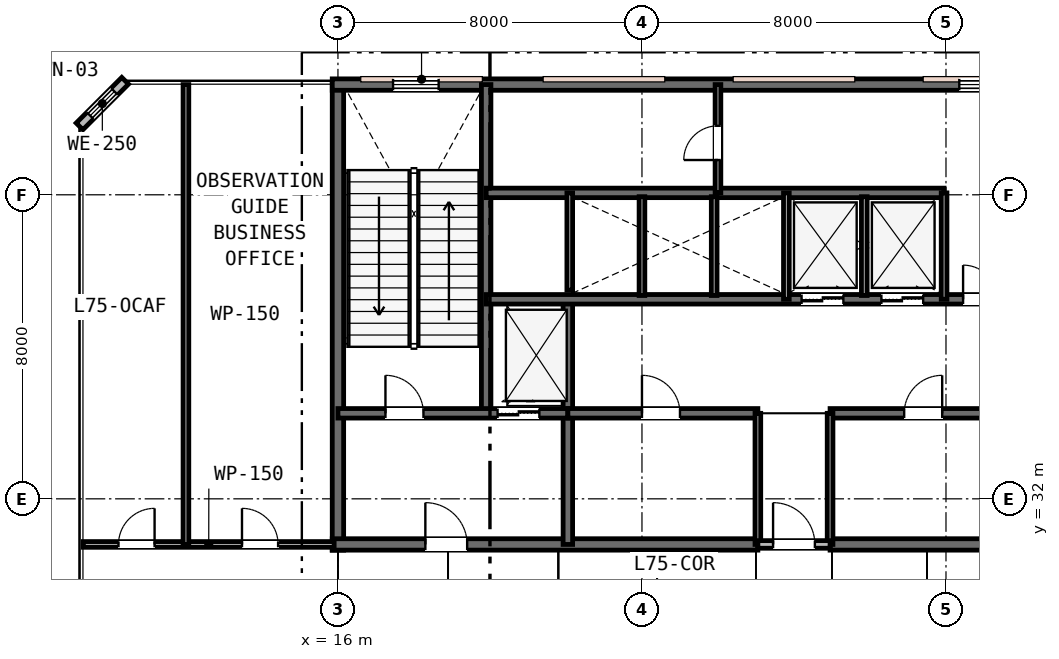
"""IFC4 building model, lengths in metres.
Left out: names, types, materials, properties, quantities, classifications, styles, units other than length and angle.
Written with IfcOpenShell. Run it as: python <this file> out.ifc"""

import sys

from ifc_helpers import new_model, si_unit, direction, frame, frame_2d, origin, place, context, subcontext, project, spatial, rectangle, extrude, element, fill, save


model = new_model("IFC4")
c1 = context("Model", 3, precision=1e-05, world=origin(), true_north=direction((0.0, 1.0)))
c2 = subcontext(c1, "Body", "Model", "MODEL_VIEW")
j1 = project(units=[si_unit("LENGTHUNIT", "METRE"), si_unit("PLANEANGLEUNIT", "RADIAN")], contexts=[c1])
p1 = place(None, origin())
s1 = spatial("IfcSite", under=j1, at=p1, CompositionType="ELEMENT")
p2 = place(p1, origin())
s2 = spatial("IfcBuilding", under=s1, at=p2, CompositionType="ELEMENT")
p3 = place(p2, frame((0.0, 0.0, 290.6)))
s3 = spatial("IfcBuildingStorey", under=s2, at=p3, CompositionType="ELEMENT", Elevation=290.6)
p4 = place(p3, frame((16.0, 30.65, 0.0), z_axis=(0.0, 0.0, 1.0), x_axis=(0.0, 1.0, 0.0)))
e1 = element("IfcWall", 1, at=p4, inside=s3, PredefinedType="SHEAR", context=c2, shape_type="SweptSolid", body=[
    extrude(rectangle(XDim=12.3, YDim=0.3, at=frame_2d((6.15, 0.0))), origin(), (0.0, 0.0, 1.0), 5.2),
])
p5 = place(p3, frame((15.85, 42.9, 0.0), z_axis=(0.0, 0.0, 1.0), x_axis=(1.0, 0.0, 0.0)))
e2 = element("IfcWall", 2, at=p5, inside=s3, PredefinedType="SHEAR", context=c2, shape_type="SweptSolid", body=[
    extrude(rectangle(XDim=24.3, YDim=0.3, at=frame_2d((12.15, 0.0))), origin(), (0.0, 0.0, 1.0), 5.2),
])
p6 = place(p5, frame((1.6, 0.0, 0.95)))
e3 = element("IfcOpeningElement", 3, at=p6, cuts=e2, PredefinedType="OPENING", context=c2, shape_type="SweptSolid", body=[
    extrude(rectangle(XDim=1.2, YDim=1.6, at=frame_2d((0.6, 0.8))), frame((0.0, 0.16, 0.0), z_axis=(0.0, -1.0, 0.0), x_axis=(1.0, 0.0, 0.0)), (0.0, 0.0, 1.0), 0.32),
])
p7 = place(p5, frame((16.5, 0.0, 0.95)))
e4 = element("IfcOpeningElement", 4, at=p7, cuts=e2, PredefinedType="OPENING", context=c2, shape_type="SweptSolid", body=[
    extrude(rectangle(XDim=1.2, YDim=1.6, at=frame_2d((0.6, 0.8))), frame((0.0, 0.16, 0.0), z_axis=(0.0, -1.0, 0.0), x_axis=(1.0, 0.0, 0.0)), (0.0, 0.0, 1.0), 0.32),
])
p8 = place(p5, frame((21.6, 0.0, 0.95)))
e5 = element("IfcOpeningElement", 5, at=p8, cuts=e2, PredefinedType="OPENING", context=c2, shape_type="SweptSolid", body=[
    extrude(rectangle(XDim=1.2, YDim=1.6, at=frame_2d((0.6, 0.8))), frame((0.0, 0.16, 0.0), z_axis=(0.0, -1.0, 0.0), x_axis=(1.0, 0.0, 0.0)), (0.0, 0.0, 1.0), 0.32),
])
p9 = place(p3, frame((15.85, 30.8, 0.0), z_axis=(0.0, 0.0, 1.0), x_axis=(1.0, 0.0, 0.0)))
e6 = element("IfcWall", 6, at=p9, inside=s3, PredefinedType="SHEAR", context=c2, shape_type="SweptSolid", body=[
    extrude(rectangle(XDim=11.2, YDim=0.3, at=frame_2d((5.6, 0.0))), origin(), (0.0, 0.0, 1.0), 5.2),
])
p10 = place(p9, frame((2.45, 0.0, 0.0)))
e7 = element("IfcOpeningElement", 7, at=p10, cuts=e6, PredefinedType="OPENING", context=c2, shape_type="SweptSolid", body=[
    extrude(rectangle(XDim=1.1, YDim=2.15, at=frame_2d((0.55, 1.075))), frame((0.0, 0.16, 0.0), z_axis=(0.0, -1.0, 0.0), x_axis=(1.0, 0.0, 0.0)), (0.0, 0.0, 1.0), 0.32),
])
p11 = place(p3, frame((28.95, 30.8, 0.0), z_axis=(0.0, 0.0, 1.0), x_axis=(1.0, 0.0, 0.0)))
e8 = element("IfcWall", 8, at=p11, inside=s3, PredefinedType="SHEAR", context=c2, shape_type="SweptSolid", body=[
    extrude(rectangle(XDim=11.2, YDim=0.3, at=frame_2d((5.6, 0.0))), origin(), (0.0, 0.0, 1.0), 5.2),
])
p12 = place(p11, frame((7.65, 0.0, 0.0)))
e9 = element("IfcOpeningElement", 9, at=p12, cuts=e8, PredefinedType="OPENING", context=c2, shape_type="SweptSolid", body=[
    extrude(rectangle(XDim=1.1, YDim=2.15, at=frame_2d((0.55, 1.075))), frame((0.0, 0.16, 0.0), z_axis=(0.0, -1.0, 0.0), x_axis=(1.0, 0.0, 0.0)), (0.0, 0.0, 1.0), 0.32),
])
p13 = place(p3, frame((19.9, 34.25, 0.0), z_axis=(0.0, 0.0, 1.0), x_axis=(0.0, 1.0, 0.0)))
e10 = element("IfcWall", 10, at=p13, inside=s3, PredefinedType="SHEAR", context=c2, shape_type="SweptSolid", body=[
    extrude(rectangle(XDim=8.65, YDim=0.25, at=frame_2d((4.325, 0.0))), origin(), (0.0, 0.0, 1.0), 5.2),
])
p14 = place(p3, frame((22.05, 30.8, 0.0), z_axis=(0.0, 0.0, 1.0), x_axis=(0.0, 1.0, 0.0)))
e11 = element("IfcWall", 11, at=p14, inside=s3, PredefinedType="SHEAR", context=c2, shape_type="SweptSolid", body=[
    extrude(rectangle(XDim=6.45, YDim=0.25, at=frame_2d((3.225, 0.0))), origin(), (0.0, 0.0, 1.0), 5.2),
])
p15 = place(p3, frame((16.0, 34.25, 0.0), z_axis=(0.0, 0.0, 1.0), x_axis=(1.0, 0.0, 0.0)))
e12 = element("IfcWall", 12, at=p15, inside=s3, PredefinedType="SHEAR", context=c2, shape_type="SweptSolid", body=[
    extrude(rectangle(XDim=6.05, YDim=0.25, at=frame_2d((3.025, 0.0))), origin(), (0.0, 0.0, 1.0), 5.2),
])
p16 = place(p15, frame((1.25, 0.0, 0.0)))
e13 = element("IfcOpeningElement", 13, at=p16, cuts=e12, PredefinedType="OPENING", context=c2, shape_type="SweptSolid", body=[
    extrude(rectangle(XDim=1.0, YDim=2.15, at=frame_2d((0.5, 1.075))), frame((0.0, 0.135, 0.0), z_axis=(0.0, -1.0, 0.0), x_axis=(1.0, 0.0, 0.0)), (0.0, 0.0, 1.0), 0.27),
])
p17 = place(p15, frame((4.2, 0.0, 0.0)))
e14 = element("IfcOpeningElement", 14, at=p17, cuts=e12, PredefinedType="OPENING", context=c2, shape_type="SweptSolid", body=[
    extrude(rectangle(XDim=1.1, YDim=2.15, at=frame_2d((0.55, 1.075))), frame((0.0, 0.135, 0.0), z_axis=(0.0, -1.0, 0.0), x_axis=(1.0, 0.0, 0.0)), (0.0, 0.0, 1.0), 0.27),
])
p18 = place(p3, frame((22.05, 34.25, 0.0), z_axis=(0.0, 0.0, 1.0), x_axis=(1.0, 0.0, 0.0)))
e15 = element("IfcWall", 15, at=p18, inside=s3, PredefinedType="SHEAR", context=c2, shape_type="SweptSolid", body=[
    extrude(rectangle(XDim=5.0, YDim=0.25, at=frame_2d((2.5, 0.0))), origin(), (0.0, 0.0, 1.0), 5.2),
])
p19 = place(p18, frame((1.95, 0.0, 0.0)))
e16 = element("IfcOpeningElement", 16, at=p19, cuts=e15, PredefinedType="OPENING", context=c2, shape_type="SweptSolid", body=[
    extrude(rectangle(XDim=1.0, YDim=2.15, at=frame_2d((0.5, 1.075))), frame((0.0, 0.135, 0.0), z_axis=(0.0, -1.0, 0.0), x_axis=(1.0, 0.0, 0.0)), (0.0, 0.0, 1.0), 0.27),
])
p20 = place(p3, frame((28.95, 34.25, 0.0), z_axis=(0.0, 0.0, 1.0), x_axis=(1.0, 0.0, 0.0)))
e17 = element("IfcWall", 17, at=p20, inside=s3, PredefinedType="SHEAR", context=c2, shape_type="SweptSolid", body=[
    extrude(rectangle(XDim=5.0, YDim=0.25, at=frame_2d((2.5, 0.0))), origin(), (0.0, 0.0, 1.0), 5.2),
])
p21 = place(p20, frame((1.95, 0.0, 0.0)))
e18 = element("IfcOpeningElement", 18, at=p21, cuts=e17, PredefinedType="OPENING", context=c2, shape_type="SweptSolid", body=[
    extrude(rectangle(XDim=1.0, YDim=2.15, at=frame_2d((0.5, 1.075))), frame((0.0, 0.135, 0.0), z_axis=(0.0, -1.0, 0.0), x_axis=(1.0, 0.0, 0.0)), (0.0, 0.0, 1.0), 0.27),
])
p22 = place(p3, frame((19.9, 37.25, 0.0), z_axis=(0.0, 0.0, 1.0), x_axis=(1.0, 0.0, 0.0)))
e19 = element("IfcWall", 19, at=p22, inside=s3, PredefinedType="SHEAR", context=c2, shape_type="SweptSolid", body=[
    extrude(rectangle(XDim=16.2, YDim=0.25, at=frame_2d((8.1, 0.0))), origin(), (0.0, 0.0, 1.0), 5.2),
])
p23 = place(p22, frame((12.55, 0.0, 0.0)))
e20 = element("IfcOpeningElement", 20, at=p23, cuts=e19, PredefinedType="OPENING", context=c2, shape_type="SweptSolid", body=[
    extrude(rectangle(XDim=0.9, YDim=2.15, at=frame_2d((0.45, 1.075))), frame((0.0, 0.135, 0.0), z_axis=(0.0, -1.0, 0.0), x_axis=(1.0, 0.0, 0.0)), (0.0, 0.0, 1.0), 0.27),
])
p24 = place(p22, frame((8.3, 0.0, 0.0)))
e21 = element("IfcOpeningElement", 21, at=p24, cuts=e19, PredefinedType="OPENING", context=c2, shape_type="SweptSolid", body=[
    extrude(rectangle(XDim=1.1, YDim=2.15, at=frame_2d((0.55, 1.075))), frame((0.0, 0.135, 0.0), z_axis=(0.0, -1.0, 0.0), x_axis=(1.0, 0.0, 0.0)), (0.0, 0.0, 1.0), 0.27),
])
p25 = place(p22, frame((10.4, 0.0, 0.0)))
e22 = element("IfcOpeningElement", 22, at=p25, cuts=e19, PredefinedType="OPENING", context=c2, shape_type="SweptSolid", body=[
    extrude(rectangle(XDim=1.1, YDim=2.15, at=frame_2d((0.55, 1.075))), frame((0.0, 0.135, 0.0), z_axis=(0.0, -1.0, 0.0), x_axis=(1.0, 0.0, 0.0)), (0.0, 0.0, 1.0), 0.27),
])
p26 = place(p3, frame((19.9, 40.05, 0.0), z_axis=(0.0, 0.0, 1.0), x_axis=(1.0, 0.0, 0.0)))
e23 = element("IfcWall", 23, at=p26, inside=s3, PredefinedType="SHEAR", context=c2, shape_type="SweptSolid", body=[
    extrude(rectangle(XDim=12.05, YDim=0.25, at=frame_2d((6.025, 0.0))), origin(), (0.0, 0.0, 1.0), 5.2),
])
p27 = place(p3, frame((10.4, 43.0, 0.0), z_axis=(0.0, 0.0, 1.0), x_axis=(-0.707106781187, -0.707106781187, 0.0)))
e24 = element("IfcWall", 24, at=p27, inside=s3, PredefinedType="STANDARD", context=c2, shape_type="SweptSolid", body=[
    extrude(rectangle(XDim=1.697, YDim=0.25, at=frame_2d((0.849, 0.0))), origin(), (0.0, 0.0, 1.0), 4.87),
])
p28 = place(p27, frame((0.399, 0.0, 0.9)))
e25 = element("IfcOpeningElement", 25, at=p28, cuts=e24, PredefinedType="OPENING", context=c2, shape_type="SweptSolid", body=[
    extrude(rectangle(XDim=0.9, YDim=1.55, at=frame_2d((0.45, 0.775))), frame((0.0, 0.135, 0.0), z_axis=(0.0, -1.0, 0.0), x_axis=(1.0, 0.0, 0.0)), (0.0, 0.0, 1.0), 0.27),
])
for number, where, z_axis, x_axis in (
    (26, (27.05, 30.8, 0.0), (0.0, 0.0, 1.0), (0.0, 1.0, 0.0)),
    (27, (28.95, 30.8, 0.0), (0.0, 0.0, 1.0), (0.0, 1.0, 0.0)),
):
    element("IfcWall", number, at=place(p3, frame(where, z_axis=z_axis, x_axis=x_axis)), inside=s3, PredefinedType="PLUMBINGWALL", context=c2, shape_type="SweptSolid", body=[
        extrude(rectangle(XDim=3.45, YDim=0.15, at=frame_2d((1.725, 0.0))), origin(), (0.0, 0.0, 1.0), 4.67),
    ])
p29 = place(p3, frame((27.05, 30.8, 0.0), z_axis=(0.0, 0.0, 1.0), x_axis=(1.0, 0.0, 0.0)))
e28 = element("IfcWall", 28, at=p29, inside=s3, PredefinedType="PARTITIONING", context=c2, shape_type="SweptSolid", body=[
    extrude(rectangle(XDim=1.9, YDim=0.2, at=frame_2d((0.95, 0.0))), origin(), (0.0, 0.0, 1.0), 4.67),
])
p30 = place(p29, frame((0.4, 0.0, 0.0)))
e29 = element("IfcOpeningElement", 29, at=p30, cuts=e28, PredefinedType="OPENING", context=c2, shape_type="SweptSolid", body=[
    extrude(rectangle(XDim=1.1, YDim=2.15, at=frame_2d((0.55, 1.075))), frame((0.0, 0.11, 0.0), z_axis=(0.0, -1.0, 0.0), x_axis=(1.0, 0.0, 0.0)), (0.0, 0.0, 1.0), 0.22),
])
p31 = place(p3, frame((22.1, 37.49, 0.0), z_axis=(0.0, 0.0, 1.0), x_axis=(0.0, 1.0, 0.0)))
e30 = element("IfcWall", 30, at=p31, inside=s3, PredefinedType="PLUMBINGWALL", context=c2, shape_type="SweptSolid", body=[
    extrude(rectangle(XDim=2.56, YDim=0.15, at=frame_2d((1.28, 0.0))), origin(), (0.0, 0.0, 1.0), 4.87),
])
p32 = place(p3, frame((27.8, 37.25, 0.0), z_axis=(0.0, 0.0, 1.0), x_axis=(0.0, 1.0, 0.0)))
e31 = element("IfcWall", 31, at=p32, inside=s3, PredefinedType="PLUMBINGWALL", context=c2, shape_type="SweptSolid", body=[
    extrude(rectangle(XDim=2.8, YDim=0.15, at=frame_2d((1.4, 0.0))), origin(), (0.0, 0.0, 1.0), 4.87),
])
for number, where, z_axis, x_axis in (
    (32, (24.0, 37.35, 0.0), (0.0, 0.0, 1.0), (0.0, 1.0, 0.0)),
    (33, (25.9, 37.35, 0.0), (0.0, 0.0, 1.0), (0.0, 1.0, 0.0)),
):
    element("IfcWall", number, at=place(p3, frame(where, z_axis=z_axis, x_axis=x_axis)), inside=s3, PredefinedType="PLUMBINGWALL", context=c2, shape_type="SweptSolid", body=[
        extrude(rectangle(XDim=2.6, YDim=0.15, at=frame_2d((1.3, 0.0))), origin(), (0.0, 0.0, 1.0), 4.87),
    ])
p33 = place(p3, frame((31.95, 37.25, 0.0), z_axis=(0.0, 0.0, 1.0), x_axis=(0.0, 1.0, 0.0)))
e34 = element("IfcWall", 34, at=p33, inside=s3, PredefinedType="PLUMBINGWALL", context=c2, shape_type="SweptSolid", body=[
    extrude(rectangle(XDim=2.8, YDim=0.15, at=frame_2d((1.4, 0.0))), origin(), (0.0, 0.0, 1.0), 4.87),
])
p34 = place(p3, frame((29.85, 37.35, 0.0), z_axis=(0.0, 0.0, 1.0), x_axis=(0.0, 1.0, 0.0)))
e35 = element("IfcWall", 35, at=p34, inside=s3, PredefinedType="PLUMBINGWALL", context=c2, shape_type="SweptSolid", body=[
    extrude(rectangle(XDim=2.6, YDim=0.15, at=frame_2d((1.3, 0.0))), origin(), (0.0, 0.0, 1.0), 4.87),
])
p35 = place(p3, frame((26.0, 40.05, 0.0), z_axis=(0.0, 0.0, 1.0), x_axis=(0.0, 1.0, 0.0)))
e36 = element("IfcWall", 36, at=p35, inside=s3, PredefinedType="PARTITIONING", context=c2, shape_type="SweptSolid", body=[
    extrude(rectangle(XDim=2.85, YDim=0.15, at=frame_2d((1.425, 0.0))), origin(), (0.0, 0.0, 1.0), 4.87),
])
p36 = place(p35, frame((0.865, 0.0, 0.0)))
e37 = element("IfcOpeningElement", 37, at=p36, cuts=e36, PredefinedType="OPENING", context=c2, shape_type="SweptSolid", body=[
    extrude(rectangle(XDim=0.9, YDim=2.15, at=frame_2d((0.45, 1.075))), frame((0.0, 0.085, 0.0), z_axis=(0.0, -1.0, 0.0), x_axis=(1.0, 0.0, 0.0)), (0.0, 0.0, 1.0), 0.17),
])
p37 = place(p3, frame((9.3, 30.8, 0.0), z_axis=(0.0, 0.0, 1.0), x_axis=(1.0, 0.0, 0.0)))
e38 = element("IfcWall", 38, at=p37, inside=s3, PredefinedType="PARTITIONING", context=c2, shape_type="SweptSolid", body=[
    extrude(rectangle(XDim=6.6, YDim=0.15, at=frame_2d((3.3, 0.0))), origin(), (0.0, 0.0, 1.0), 4.58),
])
p38 = place(p37, frame((0.925, 0.0, 0.0)))
e39 = element("IfcOpeningElement", 39, at=p38, cuts=e38, PredefinedType="OPENING", context=c2, shape_type="SweptSolid", body=[
    extrude(rectangle(XDim=0.95, YDim=2.15, at=frame_2d((0.475, 1.075))), frame((0.0, 0.085, 0.0), z_axis=(0.0, -1.0, 0.0), x_axis=(1.0, 0.0, 0.0)), (0.0, 0.0, 1.0), 0.17),
])
p39 = place(p37, frame((4.175, 0.0, 0.0)))
e40 = element("IfcOpeningElement", 40, at=p39, cuts=e38, PredefinedType="OPENING", context=c2, shape_type="SweptSolid", body=[
    extrude(rectangle(XDim=0.95, YDim=2.15, at=frame_2d((0.475, 1.075))), frame((0.0, 0.085, 0.0), z_axis=(0.0, -1.0, 0.0), x_axis=(1.0, 0.0, 0.0)), (0.0, 0.0, 1.0), 0.17),
])
p40 = place(p3, frame((12.0, 30.8, 0.0), z_axis=(0.0, 0.0, 1.0), x_axis=(0.0, 1.0, 0.0)))
e41 = element("IfcWall", 41, at=p40, inside=s3, PredefinedType="PARTITIONING", context=c2, shape_type="SweptSolid", body=[
    extrude(rectangle(XDim=12.1, YDim=0.15, at=frame_2d((6.05, 0.0))), origin(), (0.0, 0.0, 1.0), 4.87),
])
p41 = place(p6, origin())
e42 = element("IfcWindow", 42, at=p41, inside=s3, PartitioningType="SINGLE_PANEL", PredefinedType="WINDOW", context=c2, shape_type="SweptSolid", body=[
    extrude(rectangle(XDim=1.2, YDim=1.6, at=frame_2d((0.6, 0.8))), frame((0.0, 0.03, 0.0), z_axis=(0.0, -1.0, 0.0), x_axis=(1.0, 0.0, 0.0)), (0.0, 0.0, 1.0), 0.06),
])
fill(e3, e42)
p42 = place(p7, origin())
e43 = element("IfcWindow", 43, at=p42, inside=s3, PartitioningType="SINGLE_PANEL", PredefinedType="WINDOW", context=c2, shape_type="SweptSolid", body=[
    extrude(rectangle(XDim=1.2, YDim=1.6, at=frame_2d((0.6, 0.8))), frame((0.0, 0.03, 0.0), z_axis=(0.0, -1.0, 0.0), x_axis=(1.0, 0.0, 0.0)), (0.0, 0.0, 1.0), 0.06),
])
fill(e4, e43)
p43 = place(p28, origin())
e44 = element("IfcWindow", 44, at=p43, inside=s3, PartitioningType="SINGLE_PANEL", PredefinedType="WINDOW", context=c2, shape_type="SweptSolid", body=[
    extrude(rectangle(XDim=0.9, YDim=1.55, at=frame_2d((0.45, 0.775))), frame((0.0, 0.03, 0.0), z_axis=(0.0, -1.0, 0.0), x_axis=(1.0, 0.0, 0.0)), (0.0, 0.0, 1.0), 0.06),
])
fill(e25, e44)
p44 = place(p30, origin())
e45 = element("IfcDoor", 45, at=p44, inside=s3, OperationType="SINGLE_SWING_LEFT", PredefinedType="DOOR", context=c2, shape_type="SweptSolid", body=[
    extrude(rectangle(XDim=1.1, YDim=2.15, at=frame_2d((0.55, 1.075))), frame((0.0, 0.025, 0.0), z_axis=(0.0, -1.0, 0.0), x_axis=(1.0, 0.0, 0.0)), (0.0, 0.0, 1.0), 0.05),
])
fill(e29, e45)
p45 = place(p16, origin())
e46 = element("IfcDoor", 46, at=p45, inside=s3, OperationType="SINGLE_SWING_LEFT", PredefinedType="DOOR", context=c2, shape_type="SweptSolid", body=[
    extrude(rectangle(XDim=1.0, YDim=2.15, at=frame_2d((0.5, 1.075))), frame((0.0, 0.025, 0.0), z_axis=(0.0, -1.0, 0.0), x_axis=(1.0, 0.0, 0.0)), (0.0, 0.0, 1.0), 0.05),
])
fill(e13, e46)
p46 = place(p10, origin())
e47 = element("IfcDoor", 47, at=p46, inside=s3, OperationType="SINGLE_SWING_LEFT", PredefinedType="DOOR", context=c2, shape_type="SweptSolid", body=[
    extrude(rectangle(XDim=1.1, YDim=2.15, at=frame_2d((0.55, 1.075))), frame((0.0, 0.025, 0.0), z_axis=(0.0, -1.0, 0.0), x_axis=(1.0, 0.0, 0.0)), (0.0, 0.0, 1.0), 0.05),
])
fill(e7, e47)
p47 = place(p19, origin())
e48 = element("IfcDoor", 48, at=p47, inside=s3, OperationType="SINGLE_SWING_LEFT", PredefinedType="DOOR", context=c2, shape_type="SweptSolid", body=[
    extrude(rectangle(XDim=1.0, YDim=2.15, at=frame_2d((0.5, 1.075))), frame((0.0, 0.025, 0.0), z_axis=(0.0, -1.0, 0.0), x_axis=(1.0, 0.0, 0.0)), (0.0, 0.0, 1.0), 0.05),
])
fill(e16, e48)
p48 = place(p21, origin())
e49 = element("IfcDoor", 49, at=p48, inside=s3, OperationType="SINGLE_SWING_RIGHT", PredefinedType="DOOR", context=c2, shape_type="SweptSolid", body=[
    extrude(rectangle(XDim=1.0, YDim=2.15, at=frame_2d((0.5, 1.075))), frame((0.0, 0.025, 0.0), z_axis=(0.0, -1.0, 0.0), x_axis=(1.0, 0.0, 0.0)), (0.0, 0.0, 1.0), 0.05),
])
fill(e18, e49)
p49 = place(p23, origin())
e50 = element("IfcDoor", 50, at=p49, inside=s3, OperationType="SINGLE_SWING_LEFT", PredefinedType="DOOR", context=c2, shape_type="SweptSolid", body=[
    extrude(rectangle(XDim=0.9, YDim=2.15, at=frame_2d((0.45, 1.075))), frame((0.0, 0.025, 0.0), z_axis=(0.0, -1.0, 0.0), x_axis=(1.0, 0.0, 0.0)), (0.0, 0.0, 1.0), 0.05),
])
fill(e20, e50)
p50 = place(p36, origin())
e51 = element("IfcDoor", 51, at=p50, inside=s3, OperationType="SINGLE_SWING_LEFT", PredefinedType="DOOR", context=c2, shape_type="SweptSolid", body=[
    extrude(rectangle(XDim=0.9, YDim=2.15, at=frame_2d((0.45, 1.075))), frame((0.0, 0.025, 0.0), z_axis=(0.0, -1.0, 0.0), x_axis=(1.0, 0.0, 0.0)), (0.0, 0.0, 1.0), 0.05),
])
fill(e37, e51)
p51 = place(p38, origin())
e52 = element("IfcDoor", 52, at=p51, inside=s3, OperationType="SINGLE_SWING_RIGHT", PredefinedType="DOOR", context=c2, shape_type="SweptSolid", body=[
    extrude(rectangle(XDim=0.95, YDim=2.15, at=frame_2d((0.475, 1.075))), frame((0.0, 0.025, 0.0), z_axis=(0.0, -1.0, 0.0), x_axis=(1.0, 0.0, 0.0)), (0.0, 0.0, 1.0), 0.05),
])
fill(e39, e52)
p52 = place(p39, origin())
e53 = element("IfcDoor", 53, at=p52, inside=s3, OperationType="SINGLE_SWING_LEFT", PredefinedType="DOOR", context=c2, shape_type="SweptSolid", body=[
    extrude(rectangle(XDim=0.95, YDim=2.15, at=frame_2d((0.475, 1.075))), frame((0.0, 0.025, 0.0), z_axis=(0.0, -1.0, 0.0), x_axis=(1.0, 0.0, 0.0)), (0.0, 0.0, 1.0), 0.05),
])
fill(e40, e53)
p53 = place(p17, origin())
e54 = element("IfcDoor", 54, at=p53, inside=s3, OperationType="DOUBLE_DOOR_SLIDING", PredefinedType="DOOR", context=c2, shape_type="SweptSolid", body=[
    extrude(rectangle(XDim=1.1, YDim=2.15, at=frame_2d((0.55, 1.075))), frame((0.0, 0.025, 0.0), z_axis=(0.0, -1.0, 0.0), x_axis=(1.0, 0.0, 0.0)), (0.0, 0.0, 1.0), 0.05),
])
fill(e14, e54)
p54 = place(p24, origin())
e55 = element("IfcDoor", 55, at=p54, inside=s3, OperationType="DOUBLE_DOOR_SLIDING", PredefinedType="DOOR", context=c2, shape_type="SweptSolid", body=[
    extrude(rectangle(XDim=1.1, YDim=2.15, at=frame_2d((0.55, 1.075))), frame((0.0, 0.025, 0.0), z_axis=(0.0, -1.0, 0.0), x_axis=(1.0, 0.0, 0.0)), (0.0, 0.0, 1.0), 0.05),
])
fill(e21, e55)
p55 = place(p25, origin())
e56 = element("IfcDoor", 56, at=p55, inside=s3, OperationType="DOUBLE_DOOR_SLIDING", PredefinedType="DOOR", context=c2, shape_type="SweptSolid", body=[
    extrude(rectangle(XDim=1.1, YDim=2.15, at=frame_2d((0.55, 1.075))), frame((0.0, 0.025, 0.0), z_axis=(0.0, -1.0, 0.0), x_axis=(1.0, 0.0, 0.0)), (0.0, 0.0, 1.0), 0.05),
])
fill(e22, e56)
save(model, sys.argv[1])
